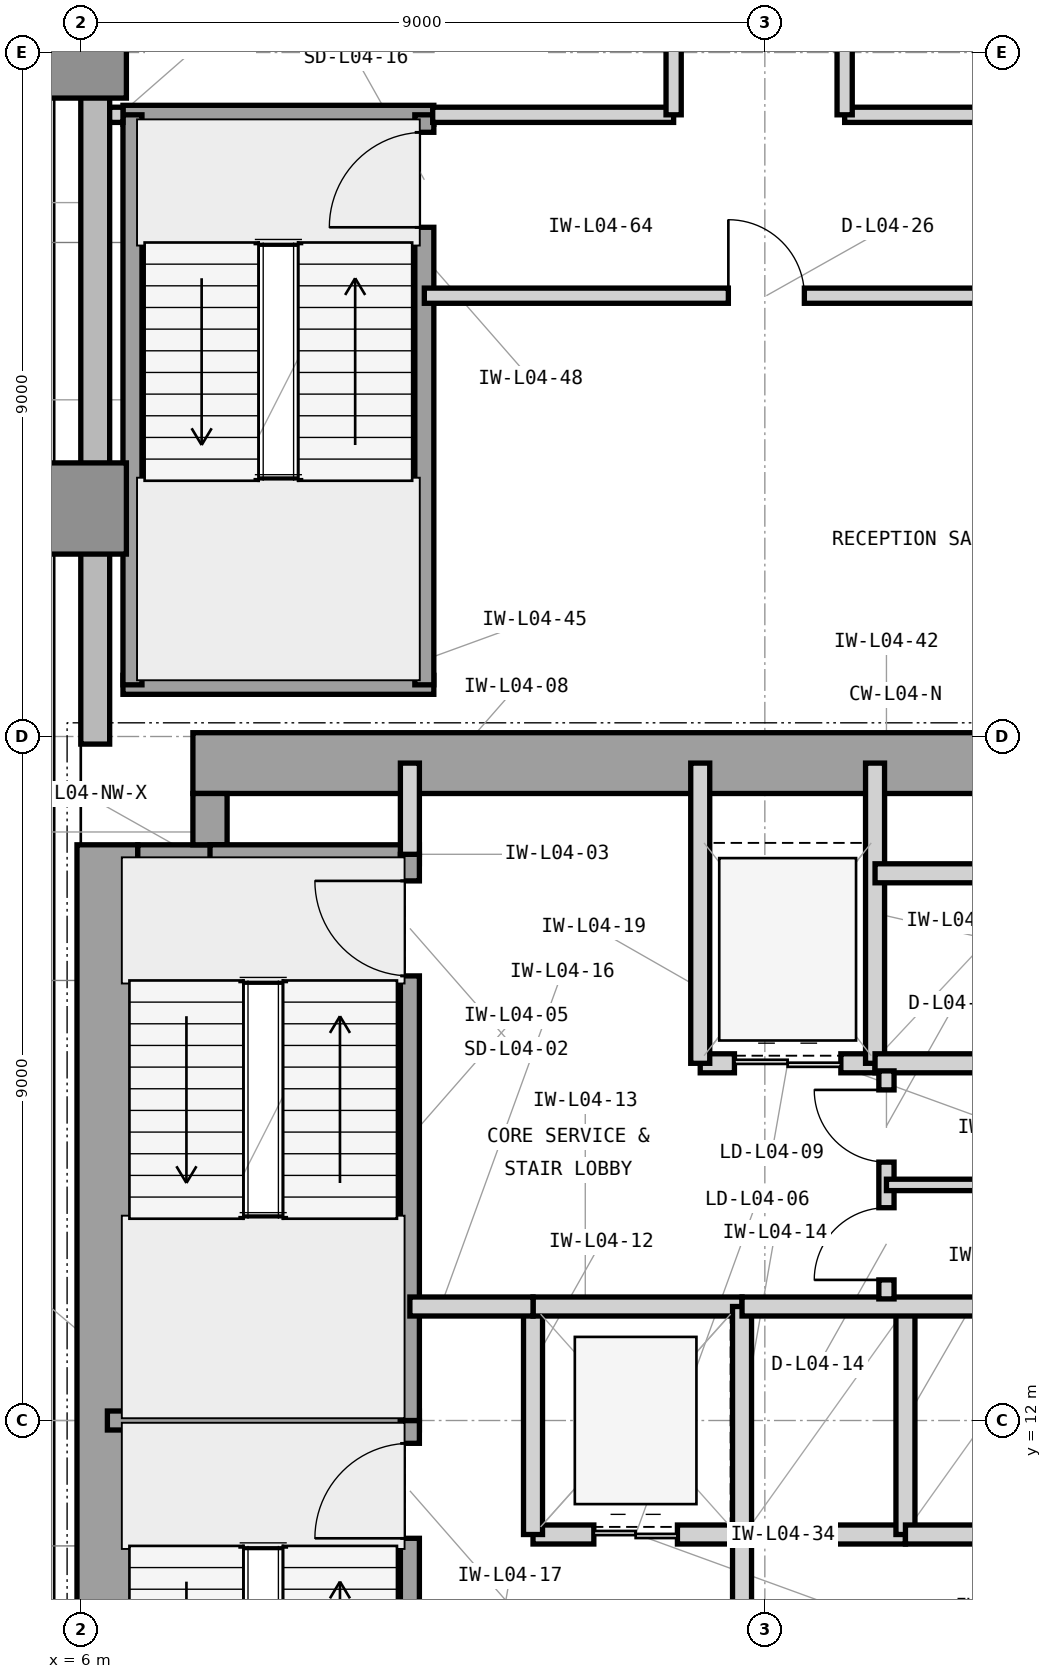
"""IFC4 building model, lengths in metres.
Left out: names, types, materials, properties, quantities, classifications, styles, units other than length and angle.
Written with IfcOpenShell. Run it as: python <this file> out.ifc"""

import sys

from ifc_helpers import new_model, si_unit, direction, frame, frame_2d, origin, origin_2d, place, context, subcontext, project, spatial, rectangle, extrude, element, fill, save


model = new_model("IFC4")
c1 = context("Model", 3, precision=1e-05, world=origin(), true_north=direction((0.0, 1.0)))
c2 = subcontext(c1, "Body", "Model", "MODEL_VIEW")
j1 = project(units=[si_unit("LENGTHUNIT", "METRE"), si_unit("PLANEANGLEUNIT", "RADIAN")], contexts=[c1])
p1 = place(None, origin())
s1 = spatial("IfcSite", under=j1, at=p1, CompositionType="ELEMENT")
p2 = place(p1, origin())
s2 = spatial("IfcBuilding", under=s1, at=p2, CompositionType="ELEMENT")
p3 = place(p2, frame((0.0, 0.0, 21.6)))
s3 = spatial("IfcBuildingStorey", under=s2, at=p3, CompositionType="ELEMENT", Elevation=21.6)
p4 = place(p3, frame((6.35, 4.425, 0.0), z_axis=(0.0, 0.0, 1.0), x_axis=(0.0, 1.0, 0.0)))
e1 = element("IfcWall", 1, at=p4, inside=s3, PredefinedType="SHEAR", context=c2, shape_type="SweptSolid", body=[
    extrude(rectangle(XDim=15.15, YDim=0.8, at=frame_2d((7.575, 0.0))), origin(), (0.0, 0.0, 1.0), 4.2),
])
p5 = place(p3, frame((7.475, 20.65, 0.0), z_axis=(0.0, 0.0, 1.0), x_axis=(1.0, 0.0, 0.0)))
e2 = element("IfcWall", 2, at=p5, inside=s3, PredefinedType="SHEAR", context=c2, shape_type="SweptSolid", body=[
    extrude(rectangle(XDim=12.325, YDim=0.8, at=frame_2d((6.163, 0.0))), origin(), (0.0, 0.0, 1.0), 4.2),
])
p6 = place(p3, frame((6.75, 19.35, 0.0), z_axis=(0.0, 0.0, 1.0), x_axis=(1.0, 0.0, 0.0)))
e3 = element("IfcWall", 3, at=p6, inside=s3, PredefinedType="SHEAR", context=c2, shape_type="SweptSolid", body=[
    extrude(rectangle(XDim=1.175, YDim=0.45, at=frame_2d((0.587, 0.0))), origin(), (0.0, 0.0, 1.0), 4.2),
])
p7 = place(p3, frame((7.7, 19.575, 0.0), z_axis=(0.0, 0.0, 1.0), x_axis=(0.0, 1.0, 0.0)))
e4 = element("IfcWall", 4, at=p7, inside=s3, PredefinedType="SHEAR", context=c2, shape_type="SweptSolid", body=[
    extrude(rectangle(XDim=0.675, YDim=0.45, at=frame_2d((0.337, 0.0))), origin(), (0.0, 0.0, 1.0), 4.2),
])
for number, where, z_axis, x_axis in (
    (5, (6.0, 24.0, 0.0), (0.0, 0.0, 1.0), (1.0, 0.0, 0.0)),
    (6, (6.0, 30.0, 0.0), (0.0, 0.0, 1.0), (1.0, 0.0, 0.0)),
):
    element("IfcColumn", number, at=place(p3, frame(where, z_axis=z_axis, x_axis=x_axis)), inside=s3, PredefinedType="COLUMN", context=c2, shape_type="SweptSolid", body=[
        extrude(rectangle(XDim=1.2, YDim=1.2, at=origin_2d()), origin(), (0.0, 0.0, 1.0), 4.2),
    ])
p8 = place(p3, frame((6.19, 49.4, 0.0), z_axis=(0.0, 0.0, 1.0), x_axis=(0.0, -1.0, 0.0)))
e7 = element("IfcWall", 7, at=p8, inside=s3, PredefinedType="STANDARD", context=c2, shape_type="SweptSolid", body=[
    extrude(rectangle(XDim=28.5, YDim=0.38, at=frame_2d((14.25, 0.0))), origin(), (0.0, 0.0, 1.0), 3.98),
])
p9 = place(p8, frame((15.225, 0.0, 0.85)))
e8 = element("IfcOpeningElement", 8, at=p9, cuts=e7, PredefinedType="OPENING", context=c2, shape_type="SweptSolid", body=[
    extrude(rectangle(XDim=2.8, YDim=2.45, at=frame_2d((1.4, 1.225))), frame((0.0, 0.2, 0.0), z_axis=(0.0, -1.0, 0.0), x_axis=(1.0, 0.0, 0.0)), (0.0, 0.0, 1.0), 0.4),
])
p10 = place(p8, frame((8.154, 0.0, 0.85)))
e9 = element("IfcOpeningElement", 9, at=p10, cuts=e7, PredefinedType="OPENING", context=c2, shape_type="SweptSolid", body=[
    extrude(rectangle(XDim=1.2, YDim=2.45, at=frame_2d((0.6, 1.225))), frame((0.0, 0.2, 0.0), z_axis=(0.0, -1.0, 0.0), x_axis=(1.0, 0.0, 0.0)), (0.0, 0.0, 1.0), 0.4),
])
p11 = place(p3, frame((6.35, 12.0, 0.0), z_axis=(0.0, 0.0, 1.0), x_axis=(1.0, 0.0, 0.0)))
e10 = element("IfcWall", 10, at=p11, inside=s3, PredefinedType="SHEAR", context=c2, shape_type="SweptSolid", body=[
    extrude(rectangle(XDim=4.105, YDim=0.25, at=frame_2d((2.052, 0.0))), origin(), (0.0, 0.0, 1.0), 4.2),
])
p12 = place(p3, frame((7.7, 19.45, 0.0), z_axis=(0.0, 0.0, 1.0), x_axis=(1.0, 0.0, 0.0)))
e11 = element("IfcWall", 11, at=p12, inside=s3, PredefinedType="SHEAR", context=c2, shape_type="SweptSolid", body=[
    extrude(rectangle(XDim=2.755, YDim=0.25, at=frame_2d((1.377, 0.0))), origin(), (0.0, 0.0, 1.0), 4.2),
])
p13 = place(p3, frame((10.33, 4.55, 0.0), z_axis=(0.0, 0.0, 1.0), x_axis=(0.0, 1.0, 0.0)))
e12 = element("IfcWall", 12, at=p13, inside=s3, PredefinedType="SHEAR", context=c2, shape_type="SweptSolid", body=[
    extrude(rectangle(XDim=7.45, YDim=0.25, at=frame_2d((3.725, 0.0))), origin(), (0.0, 0.0, 1.0), 4.2),
])
p14 = place(p13, frame((5.9, 0.0, 0.0)))
e13 = element("IfcOpeningElement", 13, at=p14, cuts=e12, PredefinedType="OPENING", context=c2, shape_type="SweptSolid", body=[
    extrude(rectangle(XDim=1.25, YDim=2.2, at=frame_2d((0.625, 1.1))), frame((0.0, 0.135, 0.0), z_axis=(0.0, -1.0, 0.0), x_axis=(1.0, 0.0, 0.0)), (0.0, 0.0, 1.0), 0.27),
])
p15 = place(p3, frame((10.33, 12.0, 0.0), z_axis=(0.0, 0.0, 1.0), x_axis=(0.0, 1.0, 0.0)))
e14 = element("IfcWall", 14, at=p15, inside=s3, PredefinedType="SHEAR", context=c2, shape_type="SweptSolid", body=[
    extrude(rectangle(XDim=7.45, YDim=0.25, at=frame_2d((3.725, 0.0))), origin(), (0.0, 0.0, 1.0), 4.2),
])
p16 = place(p15, frame((5.85, 0.0, 0.0)))
e15 = element("IfcOpeningElement", 15, at=p16, cuts=e14, PredefinedType="OPENING", context=c2, shape_type="SweptSolid", body=[
    extrude(rectangle(XDim=1.25, YDim=2.2, at=frame_2d((0.625, 1.1))), frame((0.0, 0.135, 0.0), z_axis=(0.0, -1.0, 0.0), x_axis=(1.0, 0.0, 0.0)), (0.0, 0.0, 1.0), 0.27),
])
p17 = place(p3, frame((10.33, 19.45, 0.0), z_axis=(0.0, 0.0, 1.0), x_axis=(0.0, 1.0, 0.0)))
e16 = element("IfcWall", 16, at=p17, inside=s3, PredefinedType="PARTITIONING", context=c2, shape_type="SweptSolid", body=[
    extrude(rectangle(XDim=1.2, YDim=0.25, at=frame_2d((0.6, 0.0))), origin(), (0.0, 0.0, 1.0), 3.114),
])
p18 = place(p3, frame((11.95, 10.5, 0.0), z_axis=(0.0, 0.0, 1.0), x_axis=(1.0, 0.0, 0.0)))
e17 = element("IfcWall", 17, at=p18, inside=s3, PredefinedType="PARTITIONING", context=c2, shape_type="SweptSolid", body=[
    extrude(rectangle(XDim=2.75, YDim=0.25, at=frame_2d((1.375, 0.0))), origin(), (0.0, 0.0, 1.0), 3.426),
])
p19 = place(p18, frame((0.8, 0.0, 0.0)))
e18 = element("IfcOpeningElement", 18, at=p19, cuts=e17, PredefinedType="OPENING", context=c2, shape_type="SweptSolid", body=[
    extrude(rectangle(XDim=1.1, YDim=2.25, at=frame_2d((0.55, 1.125))), frame((0.0, 0.135, 0.0), z_axis=(0.0, -1.0, 0.0), x_axis=(1.0, 0.0, 0.0)), (0.0, 0.0, 1.0), 0.27),
])
p20 = place(p3, frame((11.95, 10.5, 0.0), z_axis=(0.0, 0.0, 1.0), x_axis=(0.0, 1.0, 0.0)))
e19 = element("IfcWall", 19, at=p20, inside=s3, PredefinedType="PARTITIONING", context=c2, shape_type="SweptSolid", body=[
    extrude(rectangle(XDim=3.0, YDim=0.25, at=frame_2d((1.5, 0.0))), origin(), (0.0, 0.0, 1.0), 3.97),
])
p21 = place(p3, frame((11.95, 13.5, 0.0), z_axis=(0.0, 0.0, 1.0), x_axis=(1.0, 0.0, 0.0)))
e20 = element("IfcWall", 20, at=p21, inside=s3, PredefinedType="PARTITIONING", context=c2, shape_type="SweptSolid", body=[
    extrude(rectangle(XDim=2.75, YDim=0.25, at=frame_2d((1.375, 0.0))), origin(), (0.0, 0.0, 1.0), 3.426),
])
p22 = place(p3, frame((14.7, 10.5, 0.0), z_axis=(0.0, 0.0, 1.0), x_axis=(0.0, 1.0, 0.0)))
e21 = element("IfcWall", 21, at=p22, inside=s3, PredefinedType="PARTITIONING", context=c2, shape_type="SweptSolid", body=[
    extrude(rectangle(XDim=3.0, YDim=0.25, at=frame_2d((1.5, 0.0))), origin(), (0.0, 0.0, 1.0), 3.97),
])
p23 = place(p3, frame((14.7, 6.7, 0.0), z_axis=(0.0, 0.0, 1.0), x_axis=(0.0, 1.0, 0.0)))
e22 = element("IfcWall", 22, at=p23, inside=s3, PredefinedType="PARTITIONING", context=c2, shape_type="SweptSolid", body=[
    extrude(rectangle(XDim=3.8, YDim=0.25, at=frame_2d((1.9, 0.0))), origin(), (0.0, 0.0, 1.0), 3.97),
])
p24 = place(p23, frame((1.3, 0.0, 0.0)))
e23 = element("IfcOpeningElement", 23, at=p24, cuts=e22, PredefinedType="OPENING", context=c2, shape_type="SweptSolid", body=[
    extrude(rectangle(XDim=1.2, YDim=2.2, at=frame_2d((0.6, 1.1))), frame((0.0, 0.135, 0.0), z_axis=(0.0, -1.0, 0.0), x_axis=(1.0, 0.0, 0.0)), (0.0, 0.0, 1.0), 0.27),
])
p25 = place(p3, frame((10.33, 13.5, 0.0), z_axis=(0.0, 0.0, 1.0), x_axis=(1.0, 0.0, 0.0)))
e24 = element("IfcWall", 24, at=p25, inside=s3, PredefinedType="PARTITIONING", context=c2, shape_type="SweptSolid", body=[
    extrude(rectangle(XDim=1.62, YDim=0.25, at=frame_2d((0.81, 0.0))), origin(), (0.0, 0.0, 1.0), 3.426),
])
p26 = place(p3, frame((14.15, 16.7, 0.0), z_axis=(0.0, 0.0, 1.0), x_axis=(1.0, 0.0, 0.0)))
e25 = element("IfcWall", 25, at=p26, inside=s3, PredefinedType="PARTITIONING", context=c2, shape_type="SweptSolid", body=[
    extrude(rectangle(XDim=2.3, YDim=0.25, at=frame_2d((1.15, 0.0))), origin(), (0.0, 0.0, 1.0), 3.426),
])
p27 = place(p26, frame((0.45, 0.0, 0.0)))
e26 = element("IfcOpeningElement", 26, at=p27, cuts=e25, PredefinedType="OPENING", context=c2, shape_type="SweptSolid", body=[
    extrude(rectangle(XDim=1.4, YDim=2.35, at=frame_2d((0.7, 1.175))), frame((0.0, 0.135, 0.0), z_axis=(0.0, -1.0, 0.0), x_axis=(1.0, 0.0, 0.0)), (0.0, 0.0, 1.0), 0.27),
])
for number, where, z_axis, x_axis in (
    (27, (14.15, 16.7, 0.0), (0.0, 0.0, 1.0), (0.0, 1.0, 0.0)),
    (28, (16.45, 16.7, 0.0), (0.0, 0.0, 1.0), (0.0, 1.0, 0.0)),
):
    element("IfcWall", number, at=place(p3, frame(where, z_axis=z_axis, x_axis=x_axis)), inside=s3, PredefinedType="PARTITIONING", context=c2, shape_type="SweptSolid", body=[
        extrude(rectangle(XDim=3.95, YDim=0.25, at=frame_2d((1.975, 0.0))), origin(), (0.0, 0.0, 1.0), 3.97),
    ])
p28 = place(p3, frame((16.45, 16.7, 0.0), z_axis=(0.0, 0.0, 1.0), x_axis=(1.0, 0.0, 0.0)))
e29 = element("IfcWall", 29, at=p28, inside=s3, PredefinedType="PARTITIONING", context=c2, shape_type="SweptSolid", body=[
    extrude(rectangle(XDim=2.3, YDim=0.25, at=frame_2d((1.15, 0.0))), origin(), (0.0, 0.0, 1.0), 3.426),
])
p29 = place(p3, frame((16.45, 19.2, 0.0), z_axis=(0.0, 0.0, 1.0), x_axis=(1.0, 0.0, 0.0)))
e30 = element("IfcWall", 30, at=p29, inside=s3, PredefinedType="PARTITIONING", context=c2, shape_type="SweptSolid", body=[
    extrude(rectangle(XDim=7.2, YDim=0.25, at=frame_2d((3.6, 0.0))), origin(), (0.0, 0.0, 1.0), 3.97),
])
p30 = place(p3, frame((14.7, 10.5, 0.0), z_axis=(0.0, 0.0, 1.0), x_axis=(1.0, 0.0, 0.0)))
e31 = element("IfcWall", 31, at=p30, inside=s3, PredefinedType="PARTITIONING", context=c2, shape_type="SweptSolid", body=[
    extrude(rectangle(XDim=2.15, YDim=0.25, at=frame_2d((1.075, 0.0))), origin(), (0.0, 0.0, 1.0), 3.426),
])
p31 = place(p3, frame((16.85, 10.5, 0.0), z_axis=(0.0, 0.0, 1.0), x_axis=(0.0, 1.0, 0.0)))
e32 = element("IfcWall", 32, at=p31, inside=s3, PredefinedType="PARTITIONING", context=c2, shape_type="SweptSolid", body=[
    extrude(rectangle(XDim=3.0, YDim=0.25, at=frame_2d((1.5, 0.0))), origin(), (0.0, 0.0, 1.0), 3.97),
])
p32 = place(p3, frame((16.85, 10.5, 0.0), z_axis=(0.0, 0.0, 1.0), x_axis=(1.0, 0.0, 0.0)))
e33 = element("IfcWall", 33, at=p32, inside=s3, PredefinedType="PARTITIONING", context=c2, shape_type="SweptSolid", body=[
    extrude(rectangle(XDim=2.1, YDim=0.25, at=frame_2d((1.05, 0.0))), origin(), (0.0, 0.0, 1.0), 3.426),
])
p33 = place(p3, frame((14.7, 13.5, 0.0), z_axis=(0.0, 0.0, 1.0), x_axis=(1.0, 0.0, 0.0)))
e34 = element("IfcWall", 34, at=p33, inside=s3, PredefinedType="PARTITIONING", context=c2, shape_type="SweptSolid", body=[
    extrude(rectangle(XDim=8.95, YDim=0.25, at=frame_2d((4.475, 0.0))), origin(), (0.0, 0.0, 1.0), 3.426),
])
p34 = place(p3, frame((16.6, 13.6, 0.0), z_axis=(0.0, 0.0, 1.0), x_axis=(0.0, 1.0, 0.0)))
e35 = element("IfcWall", 35, at=p34, inside=s3, PredefinedType="PARTITIONING", context=c2, shape_type="SweptSolid", body=[
    extrude(rectangle(XDim=3.0, YDim=0.2, at=frame_2d((1.5, 0.0))), origin(), (0.0, 0.0, 1.0), 3.97),
])
p35 = place(p34, frame((0.25, 0.0, 0.0)))
e36 = element("IfcOpeningElement", 36, at=p35, cuts=e35, PredefinedType="OPENING", context=c2, shape_type="SweptSolid", body=[
    extrude(rectangle(XDim=0.95, YDim=2.1, at=frame_2d((0.475, 1.05))), frame((0.0, 0.11, 0.0), z_axis=(0.0, -1.0, 0.0), x_axis=(1.0, 0.0, 0.0)), (0.0, 0.0, 1.0), 0.22),
])
p36 = place(p34, frame((1.8, 0.0, 0.0)))
e37 = element("IfcOpeningElement", 37, at=p36, cuts=e35, PredefinedType="OPENING", context=c2, shape_type="SweptSolid", body=[
    extrude(rectangle(XDim=0.95, YDim=2.1, at=frame_2d((0.475, 1.05))), frame((0.0, 0.11, 0.0), z_axis=(0.0, -1.0, 0.0), x_axis=(1.0, 0.0, 0.0)), (0.0, 0.0, 1.0), 0.22),
])
p37 = place(p3, frame((16.6, 15.1, 0.0), z_axis=(0.0, 0.0, 1.0), x_axis=(1.0, 0.0, 0.0)))
e38 = element("IfcWall", 38, at=p37, inside=s3, PredefinedType="PARTITIONING", context=c2, shape_type="SweptSolid", body=[
    extrude(rectangle(XDim=7.05, YDim=0.15, at=frame_2d((3.525, 0.0))), origin(), (0.0, 0.0, 1.0), 3.97),
])
for number, where, z_axis, x_axis in (
    (39, (6.555, 21.68, 0.0), (0.0, 0.0, 1.0), (1.0, 0.0, 0.0)),
    (40, (6.555, 29.18, 0.0), (0.0, 0.0, 1.0), (1.0, 0.0, 0.0)),
):
    element("IfcWall", number, at=place(p3, frame(where, z_axis=z_axis, x_axis=x_axis)), inside=s3, PredefinedType="SHEAR", context=c2, shape_type="SweptSolid", body=[
        extrude(rectangle(XDim=4.09, YDim=0.25, at=frame_2d((2.045, 0.0))), origin(), (0.0, 0.0, 1.0), 4.2),
    ])
p38 = place(p3, frame((6.68, 21.68, 0.0), z_axis=(0.0, 0.0, 1.0), x_axis=(0.0, 1.0, 0.0)))
e41 = element("IfcWall", 41, at=p38, inside=s3, PredefinedType="SHEAR", context=c2, shape_type="SweptSolid", body=[
    extrude(rectangle(XDim=7.5, YDim=0.25, at=frame_2d((3.75, 0.0))), origin(), (0.0, 0.0, 1.0), 4.2),
])
p39 = place(p3, frame((10.52, 21.68, 0.0), z_axis=(0.0, 0.0, 1.0), x_axis=(0.0, 1.0, 0.0)))
e42 = element("IfcWall", 42, at=p39, inside=s3, PredefinedType="SHEAR", context=c2, shape_type="SweptSolid", body=[
    extrude(rectangle(XDim=7.5, YDim=0.25, at=frame_2d((3.75, 0.0))), origin(), (0.0, 0.0, 1.0), 4.2),
])
p40 = place(p39, frame((6.02, 0.0, 0.0)))
e43 = element("IfcOpeningElement", 43, at=p40, cuts=e42, PredefinedType="OPENING", context=c2, shape_type="SweptSolid", body=[
    extrude(rectangle(XDim=1.25, YDim=2.2, at=frame_2d((0.625, 1.1))), frame((0.0, 0.135, 0.0), z_axis=(0.0, -1.0, 0.0), x_axis=(1.0, 0.0, 0.0)), (0.0, 0.0, 1.0), 0.27),
])
p41 = place(p3, frame((10.52, 26.8, 0.0), z_axis=(0.0, 0.0, 1.0), x_axis=(1.0, 0.0, 0.0)))
e44 = element("IfcWall", 44, at=p41, inside=s3, PredefinedType="PARTITIONING", context=c2, shape_type="SweptSolid", body=[
    extrude(rectangle(XDim=9.28, YDim=0.2, at=frame_2d((4.64, 0.0))), origin(), (0.0, 0.0, 1.0), 3.97),
])
p42 = place(p41, frame((4.0, 0.0, 0.0)))
e45 = element("IfcOpeningElement", 45, at=p42, cuts=e44, PredefinedType="OPENING", context=c2, shape_type="SweptSolid", body=[
    extrude(rectangle(XDim=1.0, YDim=2.15, at=frame_2d((0.5, 1.075))), frame((0.0, 0.11, 0.0), z_axis=(0.0, -1.0, 0.0), x_axis=(1.0, 0.0, 0.0)), (0.0, 0.0, 1.0), 0.22),
])
p43 = place(p3, frame((6.38, 29.18, 0.0), z_axis=(0.0, 0.0, 1.0), x_axis=(1.0, 0.0, 0.0)))
e46 = element("IfcWall", 46, at=p43, inside=s3, PredefinedType="PARTITIONING", context=c2, shape_type="SweptSolid", body=[
    extrude(rectangle(XDim=0.175, YDim=0.2, at=frame_2d((0.087, 0.0))), origin(), (0.0, 0.0, 1.0), 3.97),
])
p44 = place(p3, frame((10.63, 29.18, 0.0), z_axis=(0.0, 0.0, 1.0), x_axis=(1.0, 0.0, 0.0)))
e47 = element("IfcWall", 47, at=p44, inside=s3, PredefinedType="PARTITIONING", context=c2, shape_type="SweptSolid", body=[
    extrude(rectangle(XDim=3.17, YDim=0.2, at=frame_2d((1.585, 0.0))), origin(), (0.0, 0.0, 1.0), 3.97),
])
p45 = place(p3, frame((16.05, 29.18, 0.0), z_axis=(0.0, 0.0, 1.0), x_axis=(1.0, 0.0, 0.0)))
e48 = element("IfcWall", 48, at=p45, inside=s3, PredefinedType="PARTITIONING", context=c2, shape_type="SweptSolid", body=[
    extrude(rectangle(XDim=7.77, YDim=0.2, at=frame_2d((3.885, 0.0))), origin(), (0.0, 0.0, 1.0), 3.97),
])
p46 = place(p3, frame((13.8, 29.18, 0.0), z_axis=(0.0, 0.0, 1.0), x_axis=(0.0, 1.0, 0.0)))
e49 = element("IfcWall", 49, at=p46, inside=s3, PredefinedType="PARTITIONING", context=c2, shape_type="SweptSolid", body=[
    extrude(rectangle(XDim=9.0, YDim=0.2, at=frame_2d((4.5, 0.0))), origin(), (0.0, 0.0, 1.0), 3.97),
])
p47 = place(p46, frame((3.75, 0.0, 0.0)))
e50 = element("IfcOpeningElement", 50, at=p47, cuts=e49, PredefinedType="OPENING", context=c2, shape_type="SweptSolid", body=[
    extrude(rectangle(XDim=1.5, YDim=2.3, at=frame_2d((0.75, 1.15))), frame((0.0, 0.11, 0.0), z_axis=(0.0, -1.0, 0.0), x_axis=(1.0, 0.0, 0.0)), (0.0, 0.0, 1.0), 0.22),
])
p48 = place(p3, frame((16.05, 29.18, 0.0), z_axis=(0.0, 0.0, 1.0), x_axis=(0.0, 1.0, 0.0)))
e51 = element("IfcWall", 51, at=p48, inside=s3, PredefinedType="PARTITIONING", context=c2, shape_type="SweptSolid", body=[
    extrude(rectangle(XDim=9.0, YDim=0.2, at=frame_2d((4.5, 0.0))), origin(), (0.0, 0.0, 1.0), 3.97),
])
p49 = place(p48, frame((4.0, 0.0, 0.0)))
e52 = element("IfcOpeningElement", 52, at=p49, cuts=e51, PredefinedType="OPENING", context=c2, shape_type="SweptSolid", body=[
    extrude(rectangle(XDim=1.0, YDim=2.15, at=frame_2d((0.5, 1.075))), frame((0.0, 0.11, 0.0), z_axis=(0.0, -1.0, 0.0), x_axis=(1.0, 0.0, 0.0)), (0.0, 0.0, 1.0), 0.22),
])
p50 = place(p14, origin())
e53 = element("IfcDoor", 53, at=p50, inside=s3, OperationType="SINGLE_SWING_LEFT", PredefinedType="DOOR", context=c2, shape_type="SweptSolid", body=[
    extrude(rectangle(XDim=1.25, YDim=2.2, at=frame_2d((0.625, 1.1))), frame((0.0, 0.025, 0.0), z_axis=(0.0, -1.0, 0.0), x_axis=(1.0, 0.0, 0.0)), (0.0, 0.0, 1.0), 0.05),
])
fill(e13, e53)
p51 = place(p16, origin())
e54 = element("IfcDoor", 54, at=p51, inside=s3, OperationType="SINGLE_SWING_RIGHT", PredefinedType="DOOR", context=c2, shape_type="SweptSolid", body=[
    extrude(rectangle(XDim=1.25, YDim=2.2, at=frame_2d((0.625, 1.1))), frame((0.0, 0.025, 0.0), z_axis=(0.0, -1.0, 0.0), x_axis=(1.0, 0.0, 0.0)), (0.0, 0.0, 1.0), 0.05),
])
fill(e15, e54)
p52 = place(p19, origin())
e55 = element("IfcDoor", 55, at=p52, inside=s3, OperationType="DOUBLE_DOOR_SLIDING", PredefinedType="DOOR", context=c2, shape_type="SweptSolid", body=[
    extrude(rectangle(XDim=1.1, YDim=2.25, at=frame_2d((0.55, 1.125))), frame((0.0, 0.025, 0.0), z_axis=(0.0, -1.0, 0.0), x_axis=(1.0, 0.0, 0.0)), (0.0, 0.0, 1.0), 0.05),
])
fill(e18, e55)
p53 = place(p27, origin())
e56 = element("IfcDoor", 56, at=p53, inside=s3, OperationType="DOUBLE_DOOR_SLIDING", PredefinedType="DOOR", context=c2, shape_type="SweptSolid", body=[
    extrude(rectangle(XDim=1.4, YDim=2.35, at=frame_2d((0.7, 1.175))), frame((0.0, 0.025, 0.0), z_axis=(0.0, -1.0, 0.0), x_axis=(1.0, 0.0, 0.0)), (0.0, 0.0, 1.0), 0.05),
])
fill(e26, e56)
p54 = place(p35, origin())
e57 = element("IfcDoor", 57, at=p54, inside=s3, OperationType="SINGLE_SWING_LEFT", PredefinedType="DOOR", context=c2, shape_type="SweptSolid", body=[
    extrude(rectangle(XDim=0.95, YDim=2.1, at=frame_2d((0.475, 1.05))), frame((0.0, 0.025, 0.0), z_axis=(0.0, -1.0, 0.0), x_axis=(1.0, 0.0, 0.0)), (0.0, 0.0, 1.0), 0.05),
])
fill(e36, e57)
p55 = place(p36, origin())
e58 = element("IfcDoor", 58, at=p55, inside=s3, OperationType="SINGLE_SWING_RIGHT", PredefinedType="DOOR", context=c2, shape_type="SweptSolid", body=[
    extrude(rectangle(XDim=0.95, YDim=2.1, at=frame_2d((0.475, 1.05))), frame((0.0, 0.025, 0.0), z_axis=(0.0, -1.0, 0.0), x_axis=(1.0, 0.0, 0.0)), (0.0, 0.0, 1.0), 0.05),
])
fill(e37, e58)
p56 = place(p40, origin())
e59 = element("IfcDoor", 59, at=p56, inside=s3, OperationType="SINGLE_SWING_LEFT", PredefinedType="DOOR", context=c2, shape_type="SweptSolid", body=[
    extrude(rectangle(XDim=1.25, YDim=2.2, at=frame_2d((0.625, 1.1))), frame((0.0, 0.025, 0.0), z_axis=(0.0, -1.0, 0.0), x_axis=(1.0, 0.0, 0.0)), (0.0, 0.0, 1.0), 0.05),
])
fill(e43, e59)
p57 = place(p42, origin())
e60 = element("IfcDoor", 60, at=p57, inside=s3, OperationType="SINGLE_SWING_LEFT", PredefinedType="DOOR", context=c2, shape_type="SweptSolid", body=[
    extrude(rectangle(XDim=1.0, YDim=2.15, at=frame_2d((0.5, 1.075))), frame((0.0, 0.025, 0.0), z_axis=(0.0, -1.0, 0.0), x_axis=(1.0, 0.0, 0.0)), (0.0, 0.0, 1.0), 0.05),
])
fill(e45, e60)
save(model, sys.argv[1])
